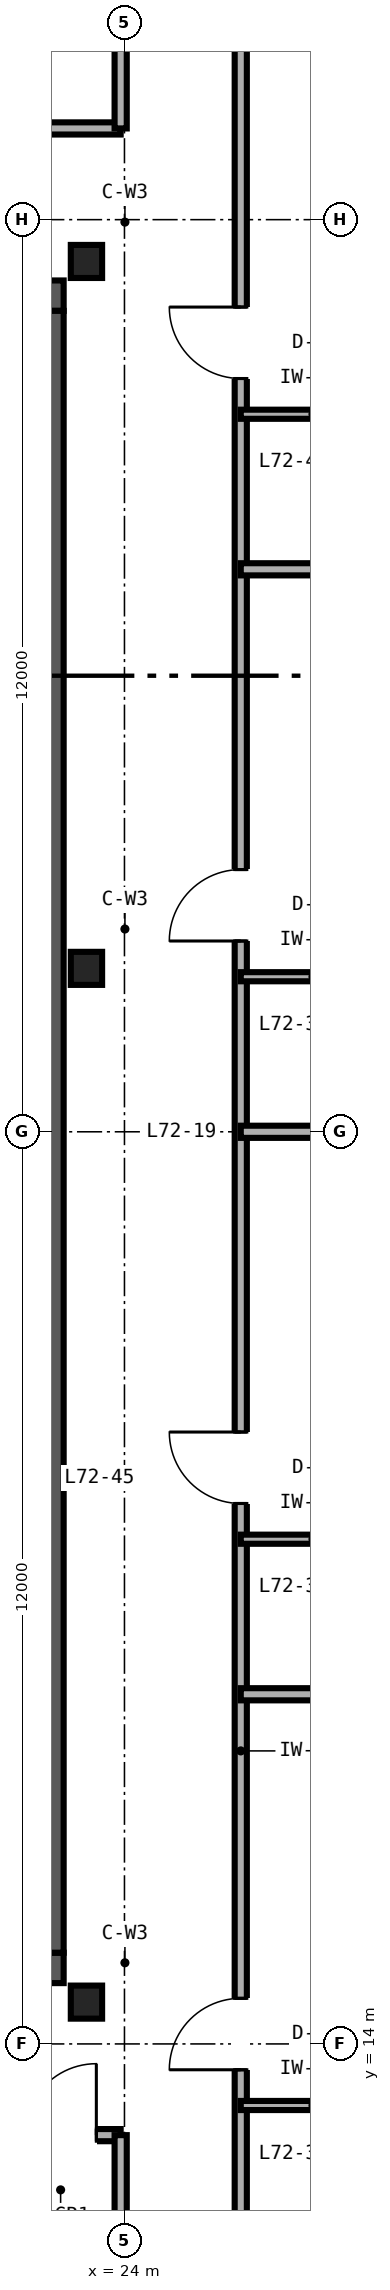
"""IFC4 building model, lengths in metres.
Left out: names, types, materials, properties, quantities, classifications, styles, units other than length and angle.
Written with IfcOpenShell. Run it as: python <this file> out.ifc"""

import sys

from ifc_helpers import new_model, si_unit, direction, frame, frame_2d, origin, origin_2d, place, context, subcontext, project, spatial, rectangle, i_section, extrude, source, transform, mapped, element, fill, save


model = new_model("IFC4")
c1 = context("Model", 3, precision=1e-05, world=origin(), true_north=direction((0.0, 1.0)))
c2 = subcontext(c1, "Body", "Model", "MODEL_VIEW")
j1 = project(units=[si_unit("LENGTHUNIT", "METRE"), si_unit("PLANEANGLEUNIT", "RADIAN")], contexts=[c1])
p1 = place(None, origin())
s1 = spatial("IfcSite", under=j1, at=p1, CompositionType="ELEMENT")
p2 = place(p1, origin())
s2 = spatial("IfcBuilding", under=s1, at=p2, CompositionType="ELEMENT")
p3 = place(p2, frame((0.0, 0.0, 283.2)))
s3 = spatial("IfcBuildingStorey", under=s2, at=p3, CompositionType="ELEMENT", Elevation=283.2)
p4 = place(p3, frame((10.8, 15.0, 0.0), z_axis=(0.0, 0.0, 1.0), x_axis=(1.0, 0.0, 0.0)))
e1 = element("IfcWall", 1, at=p4, inside=s3, PredefinedType="SHEAR", context=c2, shape_type="SweptSolid", body=[
    extrude(rectangle(XDim=12.4, YDim=0.4, at=frame_2d((6.2, 0.0))), origin(), (0.0, 0.0, 1.0), 3.38),
])
p5 = place(p4, frame((8.78, 0.0, 0.0)))
e2 = element("IfcOpeningElement", 2, at=p5, cuts=e1, PredefinedType="OPENING", context=c2, shape_type="SweptSolid", body=[
    extrude(rectangle(XDim=1.0, YDim=2.15, at=frame_2d((0.5, 1.075))), frame((0.0, 0.21, 0.0), z_axis=(0.0, -1.0, 0.0), x_axis=(1.0, 0.0, 0.0)), (0.0, 0.0, 1.0), 0.42),
])
p6 = place(p3, frame((10.8, 37.0, 0.0), z_axis=(0.0, 0.0, 1.0), x_axis=(1.0, 0.0, 0.0)))
e3 = element("IfcWall", 3, at=p6, inside=s3, PredefinedType="SHEAR", context=c2, shape_type="SweptSolid", body=[
    extrude(rectangle(XDim=12.4, YDim=0.4, at=frame_2d((6.2, 0.0))), origin(), (0.0, 0.0, 1.0), 3.38),
])
p7 = place(p6, frame((8.78, 0.0, 0.0)))
e4 = element("IfcOpeningElement", 4, at=p7, cuts=e3, PredefinedType="OPENING", context=c2, shape_type="SweptSolid", body=[
    extrude(rectangle(XDim=1.0, YDim=2.15, at=frame_2d((0.5, 1.075))), frame((0.0, 0.21, 0.0), z_axis=(0.0, -1.0, 0.0), x_axis=(1.0, 0.0, 0.0)), (0.0, 0.0, 1.0), 0.42),
])
p8 = place(p3, frame((23.0, 15.2, 0.0), z_axis=(0.0, 0.0, 1.0), x_axis=(0.0, 1.0, 0.0)))
e5 = element("IfcWall", 5, at=p8, inside=s3, PredefinedType="SHEAR", context=c2, shape_type="SweptSolid", body=[
    extrude(rectangle(XDim=21.6, YDim=0.4, at=frame_2d((10.8, 0.0))), origin(), (0.0, 0.0, 1.0), 3.38),
])
m1 = source(origin(), c2, "Body", "SweptSolid", [
    extrude(i_section(OverallWidth=0.412, OverallDepth=0.435, WebThickness=0.036, FlangeThickness=0.057, FilletRadius=0.025, at=origin_2d()), origin(), (0.0, 0.0, 1.0), 3.38),
])
for number, where, z_axis, x_axis in (
    (6, (23.5, 14.55, 0.0), (0.0, 0.0, 1.0), (1.0, 0.0, 0.0)),
    (7, (23.5, 28.15, 0.0), (0.0, 0.0, 1.0), (1.0, 0.0, 0.0)),
    (8, (23.5, 37.45, 0.0), (0.0, 0.0, 1.0), (1.0, 0.0, 0.0)),
):
    element("IfcColumn", number, at=place(p3, frame(where, z_axis=z_axis, x_axis=x_axis)), inside=s3, PredefinedType="COLUMN", context=c2, shape_type="MappedRepresentation", body=[
        mapped(m1, transform((0.0, 0.0, 0.0), scale=1.0)),
    ])
p9 = place(p3, frame((11.2, 12.8, 0.0), z_axis=(0.0, 0.0, 1.0), x_axis=(1.0, 0.0, 0.0)))
e9 = element("IfcWall", 9, at=p9, inside=s3, PredefinedType="PARTITIONING", context=c2, shape_type="SweptSolid", body=[
    extrude(rectangle(XDim=12.75, YDim=0.16, at=frame_2d((6.375, 0.0))), origin(), (0.0, 0.0, 1.0), 3.38),
])
p10 = place(p9, frame((5.14, 0.0, 0.0)))
e10 = element("IfcOpeningElement", 10, at=p10, cuts=e9, PredefinedType="OPENING", context=c2, shape_type="SweptSolid", body=[
    extrude(rectangle(XDim=0.94, YDim=2.15, at=frame_2d((0.47, 1.075))), frame((0.0, 0.09, 0.0), z_axis=(0.0, -1.0, 0.0), x_axis=(1.0, 0.0, 0.0)), (0.0, 0.0, 1.0), 0.18),
])
p11 = place(p9, frame((11.49, 0.0, 0.0)))
e11 = element("IfcOpeningElement", 11, at=p11, cuts=e9, PredefinedType="OPENING", context=c2, shape_type="SweptSolid", body=[
    extrude(rectangle(XDim=0.94, YDim=2.15, at=frame_2d((0.47, 1.075))), frame((0.0, 0.09, 0.0), z_axis=(0.0, -1.0, 0.0), x_axis=(1.0, 0.0, 0.0)), (0.0, 0.0, 1.0), 0.18),
])
p12 = place(p3, frame((23.95, 8.36, 0.0), z_axis=(0.0, 0.0, 1.0), x_axis=(0.0, 1.0, 0.0)))
e12 = element("IfcWall", 12, at=p12, inside=s3, PredefinedType="PARTITIONING", context=c2, shape_type="SweptSolid", body=[
    extrude(rectangle(XDim=4.44, YDim=0.16, at=frame_2d((2.22, 0.0))), origin(), (0.0, 0.0, 1.0), 3.38),
])
p13 = place(p3, frame((11.2, 39.2, 0.0), z_axis=(0.0, 0.0, 1.0), x_axis=(1.0, 0.0, 0.0)))
e13 = element("IfcWall", 13, at=p13, inside=s3, PredefinedType="PARTITIONING", context=c2, shape_type="SweptSolid", body=[
    extrude(rectangle(XDim=12.75, YDim=0.16, at=frame_2d((6.375, 0.0))), origin(), (0.0, 0.0, 1.0), 3.38),
])
p14 = place(p13, frame((5.14, 0.0, 0.0)))
e14 = element("IfcOpeningElement", 14, at=p14, cuts=e13, PredefinedType="OPENING", context=c2, shape_type="SweptSolid", body=[
    extrude(rectangle(XDim=0.94, YDim=2.15, at=frame_2d((0.47, 1.075))), frame((0.0, 0.09, 0.0), z_axis=(0.0, -1.0, 0.0), x_axis=(1.0, 0.0, 0.0)), (0.0, 0.0, 1.0), 0.18),
])
p15 = place(p13, frame((9.095, 0.0, 0.0)))
e15 = element("IfcOpeningElement", 15, at=p15, cuts=e13, PredefinedType="OPENING", context=c2, shape_type="SweptSolid", body=[
    extrude(rectangle(XDim=0.96, YDim=2.15, at=frame_2d((0.48, 1.075))), frame((0.0, 0.09, 0.0), z_axis=(0.0, -1.0, 0.0), x_axis=(1.0, 0.0, 0.0)), (0.0, 0.0, 1.0), 0.18),
])
p16 = place(p3, frame((23.95, 39.2, 0.0), z_axis=(0.0, 0.0, 1.0), x_axis=(0.0, 1.0, 0.0)))
e16 = element("IfcWall", 16, at=p16, inside=s3, PredefinedType="PARTITIONING", context=c2, shape_type="SweptSolid", body=[
    extrude(rectangle(XDim=4.44, YDim=0.16, at=frame_2d((2.22, 0.0))), origin(), (0.0, 0.0, 1.0), 3.38),
])
p17 = place(p3, frame((25.53, 11.15, 0.0), z_axis=(0.0, 0.0, 1.0), x_axis=(0.0, 1.0, 0.0)))
e17 = element("IfcWall", 17, at=p17, inside=s3, PredefinedType="PARTITIONING", context=c2, shape_type="SweptSolid", body=[
    extrude(rectangle(XDim=29.7, YDim=0.16, at=frame_2d((14.85, 0.0))), origin(), (0.0, 0.0, 1.0), 2.524),
])
p18 = place(p17, frame((2.51, 0.0, 0.0)))
e18 = element("IfcOpeningElement", 18, at=p18, cuts=e17, PredefinedType="OPENING", context=c2, shape_type="SweptSolid", body=[
    extrude(rectangle(XDim=0.94, YDim=2.15, at=frame_2d((0.47, 1.075))), frame((0.0, 0.09, 0.0), z_axis=(0.0, -1.0, 0.0), x_axis=(1.0, 0.0, 0.0)), (0.0, 0.0, 1.0), 0.18),
])
p19 = place(p17, frame((9.96, 0.0, 0.0)))
e19 = element("IfcOpeningElement", 19, at=p19, cuts=e17, PredefinedType="OPENING", context=c2, shape_type="SweptSolid", body=[
    extrude(rectangle(XDim=0.94, YDim=2.15, at=frame_2d((0.47, 1.075))), frame((0.0, 0.09, 0.0), z_axis=(0.0, -1.0, 0.0), x_axis=(1.0, 0.0, 0.0)), (0.0, 0.0, 1.0), 0.18),
])
p20 = place(p17, frame((17.36, 0.0, 0.0)))
e20 = element("IfcOpeningElement", 20, at=p20, cuts=e17, PredefinedType="OPENING", context=c2, shape_type="SweptSolid", body=[
    extrude(rectangle(XDim=0.94, YDim=2.15, at=frame_2d((0.47, 1.075))), frame((0.0, 0.09, 0.0), z_axis=(0.0, -1.0, 0.0), x_axis=(1.0, 0.0, 0.0)), (0.0, 0.0, 1.0), 0.18),
])
p21 = place(p17, frame((24.76, 0.0, 0.0)))
e21 = element("IfcOpeningElement", 21, at=p21, cuts=e17, PredefinedType="OPENING", context=c2, shape_type="SweptSolid", body=[
    extrude(rectangle(XDim=0.94, YDim=2.15, at=frame_2d((0.47, 1.075))), frame((0.0, 0.09, 0.0), z_axis=(0.0, -1.0, 0.0), x_axis=(1.0, 0.0, 0.0)), (0.0, 0.0, 1.0), 0.18),
])
p22 = place(p3, frame((25.53, 18.6, 0.0), z_axis=(0.0, 0.0, 1.0), x_axis=(1.0, 0.0, 0.0)))
e22 = element("IfcWall", 22, at=p22, inside=s3, PredefinedType="PARTITIONING", context=c2, shape_type="SweptSolid", body=[
    extrude(rectangle(XDim=7.15, YDim=0.16, at=frame_2d((3.575, 0.0))), origin(), (0.0, 0.0, 1.0), 2.601),
])
p23 = place(p3, frame((25.53, 13.19, 0.0), z_axis=(0.0, 0.0, 1.0), x_axis=(1.0, 0.0, 0.0)))
e23 = element("IfcWall", 23, at=p23, inside=s3, PredefinedType="PARTITIONING", context=c2, shape_type="SweptSolid", body=[
    extrude(rectangle(XDim=1.9, YDim=0.12, at=frame_2d((0.95, 0.0))), origin(), (0.0, 0.0, 1.0), 3.38),
])
p24 = place(p3, frame((25.53, 26.0, 0.0), z_axis=(0.0, 0.0, 1.0), x_axis=(1.0, 0.0, 0.0)))
e24 = element("IfcWall", 24, at=p24, inside=s3, PredefinedType="PARTITIONING", context=c2, shape_type="SweptSolid", body=[
    extrude(rectangle(XDim=7.15, YDim=0.16, at=frame_2d((3.575, 0.0))), origin(), (0.0, 0.0, 1.0), 2.601),
])
p25 = place(p3, frame((25.53, 20.64, 0.0), z_axis=(0.0, 0.0, 1.0), x_axis=(1.0, 0.0, 0.0)))
e25 = element("IfcWall", 25, at=p25, inside=s3, PredefinedType="PARTITIONING", context=c2, shape_type="SweptSolid", body=[
    extrude(rectangle(XDim=1.9, YDim=0.12, at=frame_2d((0.95, 0.0))), origin(), (0.0, 0.0, 1.0), 3.38),
])
p26 = place(p3, frame((25.53, 33.4, 0.0), z_axis=(0.0, 0.0, 1.0), x_axis=(1.0, 0.0, 0.0)))
e26 = element("IfcWall", 26, at=p26, inside=s3, PredefinedType="PARTITIONING", context=c2, shape_type="SweptSolid", body=[
    extrude(rectangle(XDim=7.15, YDim=0.16, at=frame_2d((3.575, 0.0))), origin(), (0.0, 0.0, 1.0), 2.763),
])
p27 = place(p3, frame((25.53, 28.04, 0.0), z_axis=(0.0, 0.0, 1.0), x_axis=(1.0, 0.0, 0.0)))
e27 = element("IfcWall", 27, at=p27, inside=s3, PredefinedType="PARTITIONING", context=c2, shape_type="SweptSolid", body=[
    extrude(rectangle(XDim=1.9, YDim=0.12, at=frame_2d((0.95, 0.0))), origin(), (0.0, 0.0, 1.0), 2.524),
])
p28 = place(p3, frame((25.53, 35.44, 0.0), z_axis=(0.0, 0.0, 1.0), x_axis=(1.0, 0.0, 0.0)))
e28 = element("IfcWall", 28, at=p28, inside=s3, PredefinedType="PARTITIONING", context=c2, shape_type="SweptSolid", body=[
    extrude(rectangle(XDim=1.9, YDim=0.12, at=frame_2d((0.95, 0.0))), origin(), (0.0, 0.0, 1.0), 3.38),
])
m2 = source(origin(), c2, "Body", "SweptSolid", [
    extrude(rectangle(XDim=0.94, YDim=2.15, at=frame_2d((0.47, 1.075))), frame((0.0, 0.025, 0.0), z_axis=(0.0, -1.0, 0.0), x_axis=(1.0, 0.0, 0.0)), (0.0, 0.0, 1.0), 0.05),
])
p29 = place(p11, origin())
e29 = element("IfcDoor", 29, at=p29, inside=s3, OperationType="SINGLE_SWING_RIGHT", PredefinedType="DOOR", context=c2, shape_type="MappedRepresentation", body=[
    mapped(m2, transform((0.0, 0.0, 0.0), scale=1.0)),
])
fill(e11, e29)
p30 = place(p18, origin())
e30 = element("IfcDoor", 30, at=p30, inside=s3, OperationType="SINGLE_SWING_LEFT", PredefinedType="DOOR", context=c2, shape_type="MappedRepresentation", body=[
    mapped(m2, transform((0.0, 0.0, 0.0), scale=1.0)),
])
fill(e18, e30)
p31 = place(p19, origin())
e31 = element("IfcDoor", 31, at=p31, inside=s3, OperationType="SINGLE_SWING_RIGHT", PredefinedType="DOOR", context=c2, shape_type="MappedRepresentation", body=[
    mapped(m2, transform((0.0, 0.0, 0.0), scale=1.0)),
])
fill(e19, e31)
p32 = place(p20, origin())
e32 = element("IfcDoor", 32, at=p32, inside=s3, OperationType="SINGLE_SWING_LEFT", PredefinedType="DOOR", context=c2, shape_type="MappedRepresentation", body=[
    mapped(m2, transform((0.0, 0.0, 0.0), scale=1.0)),
])
fill(e20, e32)
p33 = place(p21, origin())
e33 = element("IfcDoor", 33, at=p33, inside=s3, OperationType="SINGLE_SWING_RIGHT", PredefinedType="DOOR", context=c2, shape_type="MappedRepresentation", body=[
    mapped(m2, transform((0.0, 0.0, 0.0), scale=1.0)),
])
fill(e21, e33)
save(model, sys.argv[1])
